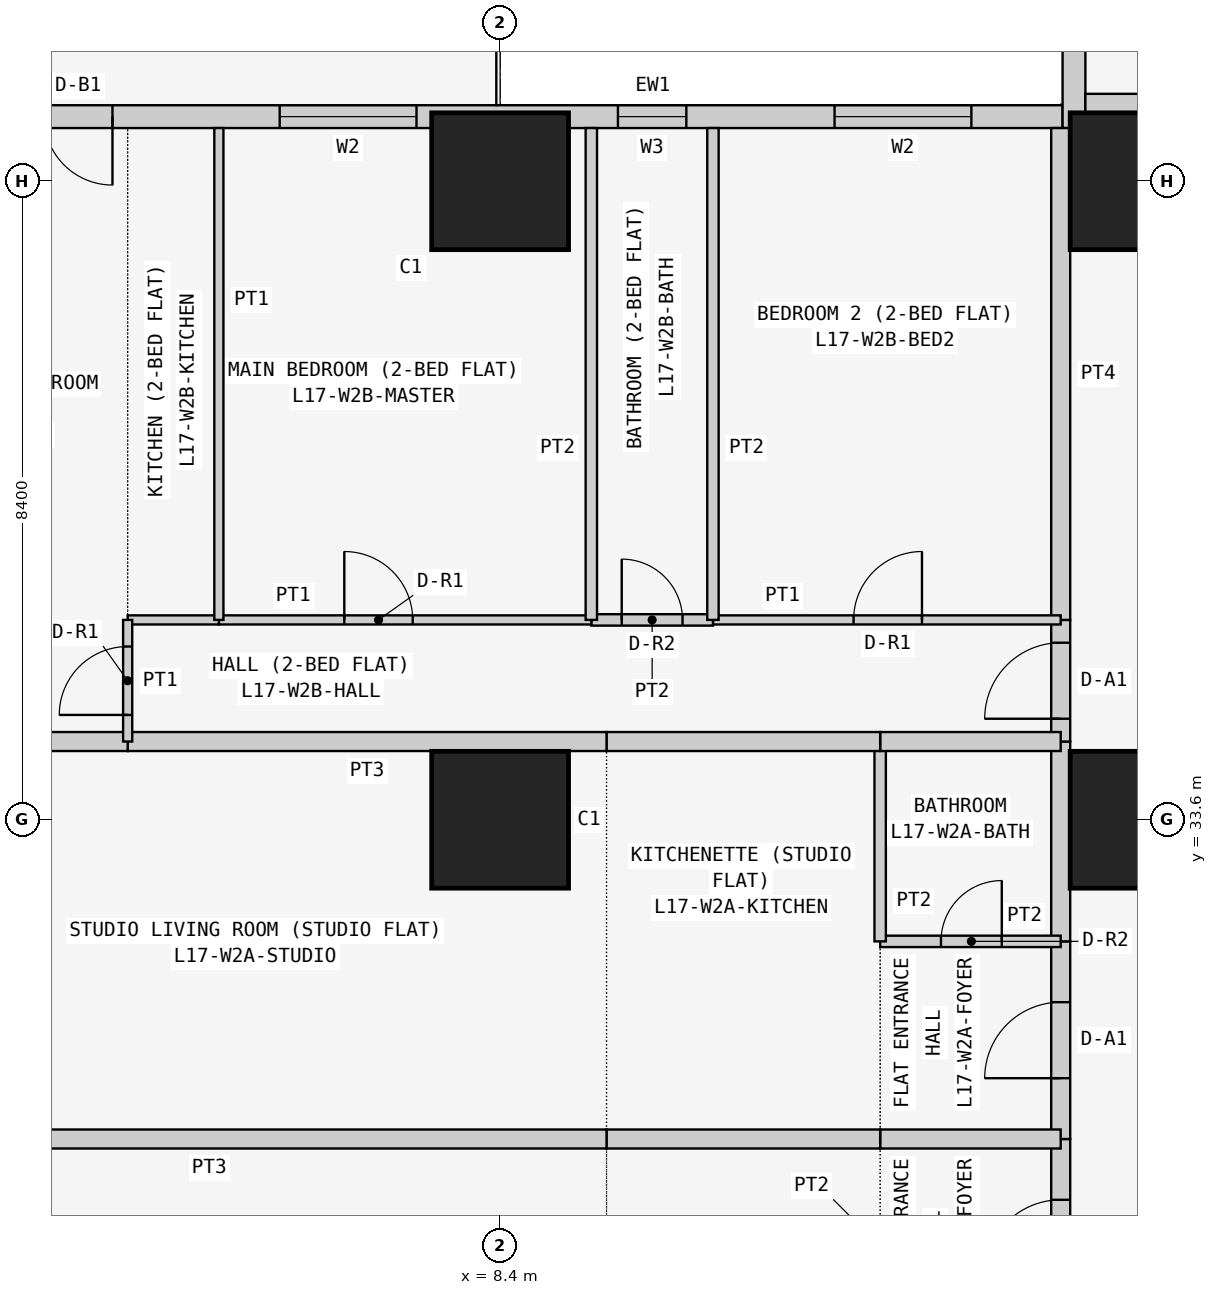
"""IFC4 building model, lengths in metres.
Left out: names, types, materials, properties, quantities, classifications, styles, units other than length and angle.
Written with IfcOpenShell. Run it as: python <this file> out.ifc"""

import sys

from ifc_helpers import new_model, si_unit, direction, frame, frame_2d, origin, origin_2d, place, context, subcontext, project, spatial, rectangle, extrude, element, fill, save


model = new_model("IFC4")
c1 = context("Model", 3, precision=1e-05, world=origin(), true_north=direction((0.0, 1.0)))
c2 = subcontext(c1, "Body", "Model", "MODEL_VIEW")
j1 = project(units=[si_unit("LENGTHUNIT", "METRE"), si_unit("PLANEANGLEUNIT", "RADIAN")], contexts=[c1])
p1 = place(None, origin())
s1 = spatial("IfcSite", under=j1, at=p1, CompositionType="ELEMENT")
p2 = place(p1, origin())
s2 = spatial("IfcBuilding", under=s1, at=p2, CompositionType="ELEMENT")
p3 = place(p2, frame((0.0, 0.0, 70.5)))
s3 = spatial("IfcBuildingStorey", under=s2, at=p3, CompositionType="ELEMENT", Elevation=70.5)
for number, where, z_axis, x_axis in (
    (1, (8.4, 33.6, 0.0), (0.0, 0.0, 1.0), (1.0, 0.0, 0.0)),
    (2, (8.4, 42.0, 0.0), (0.0, 0.0, 1.0), (1.0, 0.0, 0.0)),
    (3, (16.8, 33.6, 0.0), (0.0, 0.0, 1.0), (1.0, 0.0, 0.0)),
    (4, (16.8, 42.0, 0.0), (0.0, 0.0, 1.0), (1.0, 0.0, 0.0)),
):
    element("IfcColumn", number, at=place(p3, frame(where, z_axis=z_axis, x_axis=x_axis)), inside=s3, PredefinedType="COLUMN", context=c2, shape_type="SweptSolid", body=[
        extrude(rectangle(XDim=1.8, YDim=1.8, at=origin_2d()), origin(), (0.0, 0.0, 1.0), 3.6),
    ])
p4 = place(p3, frame((15.8, 42.85, 0.0), z_axis=(0.0, 0.0, 1.0), x_axis=(-1.0, 0.0, 0.0)))
e5 = element("IfcWall", 5, at=p4, inside=s3, PredefinedType="SOLIDWALL", context=c2, shape_type="SweptSolid", body=[
    extrude(rectangle(XDim=15.4, YDim=0.3, at=frame_2d((7.7, 0.0))), origin(), (0.0, 0.0, 1.0), 3.45),
])
p5 = place(p4, frame((1.2, 0.0, 0.9)))
e6 = element("IfcOpeningElement", 6, at=p5, cuts=e5, PredefinedType="OPENING", context=c2, shape_type="SweptSolid", body=[
    extrude(rectangle(XDim=1.8, YDim=1.5, at=frame_2d((0.9, 0.75))), frame((0.0, 0.16, 0.0), z_axis=(0.0, -1.0, 0.0), x_axis=(1.0, 0.0, 0.0)), (0.0, 0.0, 1.0), 0.32),
])
p6 = place(p4, frame((4.95, 0.0, 1.5)))
e7 = element("IfcOpeningElement", 7, at=p6, cuts=e5, PredefinedType="OPENING", context=c2, shape_type="SweptSolid", body=[
    extrude(rectangle(XDim=0.9, YDim=0.7, at=frame_2d((0.45, 0.35))), frame((0.0, 0.16, 0.0), z_axis=(0.0, -1.0, 0.0), x_axis=(1.0, 0.0, 0.0)), (0.0, 0.0, 1.0), 0.32),
])
p7 = place(p4, frame((8.5, 0.0, 0.9)))
e8 = element("IfcOpeningElement", 8, at=p7, cuts=e5, PredefinedType="OPENING", context=c2, shape_type="SweptSolid", body=[
    extrude(rectangle(XDim=1.8, YDim=1.5, at=frame_2d((0.9, 0.75))), frame((0.0, 0.16, 0.0), z_axis=(0.0, -1.0, 0.0), x_axis=(1.0, 0.0, 0.0)), (0.0, 0.0, 1.0), 0.32),
])
p8 = place(p4, frame((12.5, 0.0, 0.0)))
e9 = element("IfcOpeningElement", 9, at=p8, cuts=e5, PredefinedType="OPENING", context=c2, shape_type="SweptSolid", body=[
    extrude(rectangle(XDim=0.9, YDim=2.4, at=frame_2d((0.45, 1.2))), frame((0.0, 0.16, 0.0), z_axis=(0.0, -1.0, 0.0), x_axis=(1.0, 0.0, 0.0)), (0.0, 0.0, 1.0), 0.32),
])
p9 = place(p4, frame((13.5, 0.0, 0.9)))
e10 = element("IfcOpeningElement", 10, at=p9, cuts=e5, PredefinedType="OPENING", context=c2, shape_type="SweptSolid", body=[
    extrude(rectangle(XDim=1.2, YDim=1.5, at=frame_2d((0.6, 0.75))), frame((0.0, 0.16, 0.0), z_axis=(0.0, -1.0, 0.0), x_axis=(1.0, 0.0, 0.0)), (0.0, 0.0, 1.0), 0.32),
])
p10 = place(p3, frame((15.95, 58.4, 0.0), z_axis=(0.0, 0.0, 1.0), x_axis=(0.0, -1.0, 0.0)))
e11 = element("IfcWall", 11, at=p10, inside=s3, PredefinedType="SOLIDWALL", context=c2, shape_type="SweptSolid", body=[
    extrude(rectangle(XDim=15.7, YDim=0.3, at=frame_2d((7.85, 0.0))), origin(), (0.0, 0.0, 1.0), 3.45),
])
p11 = place(p10, frame((12.4, 0.0, 0.9)))
e12 = element("IfcOpeningElement", 12, at=p11, cuts=e11, PredefinedType="OPENING", context=c2, shape_type="SweptSolid", body=[
    extrude(rectangle(XDim=1.8, YDim=1.5, at=frame_2d((0.9, 0.75))), frame((0.0, 0.16, 0.0), z_axis=(0.0, -1.0, 0.0), x_axis=(1.0, 0.0, 0.0)), (0.0, 0.0, 1.0), 0.32),
])
p12 = place(p10, frame((9.55, 0.0, 1.5)))
e13 = element("IfcOpeningElement", 13, at=p12, cuts=e11, PredefinedType="OPENING", context=c2, shape_type="SweptSolid", body=[
    extrude(rectangle(XDim=0.9, YDim=0.7, at=frame_2d((0.45, 0.35))), frame((0.0, 0.16, 0.0), z_axis=(0.0, -1.0, 0.0), x_axis=(1.0, 0.0, 0.0)), (0.0, 0.0, 1.0), 0.32),
])
p13 = place(p10, frame((5.1, 0.0, 0.9)))
e14 = element("IfcOpeningElement", 14, at=p13, cuts=e11, PredefinedType="OPENING", context=c2, shape_type="SweptSolid", body=[
    extrude(rectangle(XDim=1.8, YDim=1.5, at=frame_2d((0.9, 0.75))), frame((0.0, 0.16, 0.0), z_axis=(0.0, -1.0, 0.0), x_axis=(1.0, 0.0, 0.0)), (0.0, 0.0, 1.0), 0.32),
])
p14 = place(p10, frame((2.0, 0.0, 0.0)))
e15 = element("IfcOpeningElement", 15, at=p14, cuts=e11, PredefinedType="OPENING", context=c2, shape_type="SweptSolid", body=[
    extrude(rectangle(XDim=0.9, YDim=2.4, at=frame_2d((0.45, 1.2))), frame((0.0, 0.16, 0.0), z_axis=(0.0, -1.0, 0.0), x_axis=(1.0, 0.0, 0.0)), (0.0, 0.0, 1.0), 0.32),
])
p15 = place(p10, frame((0.7, 0.0, 0.9)))
e16 = element("IfcOpeningElement", 16, at=p15, cuts=e11, PredefinedType="OPENING", context=c2, shape_type="SweptSolid", body=[
    extrude(rectangle(XDim=1.2, YDim=1.5, at=frame_2d((0.6, 0.75))), frame((0.0, 0.16, 0.0), z_axis=(0.0, -1.0, 0.0), x_axis=(1.0, 0.0, 0.0)), (0.0, 0.0, 1.0), 0.32),
])
p16 = place(p3, frame((16.1, 43.025, 0.0), z_axis=(0.0, 0.0, 1.0), x_axis=(1.0, 0.0, 0.0)))
e17 = element("IfcWall", 17, at=p16, inside=s3, PredefinedType="PARTITIONING", context=c2, shape_type="SweptSolid", body=[
    extrude(rectangle(XDim=6.871, YDim=0.25, at=frame_2d((3.436, 0.0))), origin(), (0.0, 0.0, 1.0), 3.45),
])
p17 = place(p3, frame((15.775, 26.8, 0.0), z_axis=(0.0, 0.0, 1.0), x_axis=(0.0, 1.0, 0.0)))
e18 = element("IfcWall", 18, at=p17, inside=s3, PredefinedType="PARTITIONING", context=c2, shape_type="SweptSolid", body=[
    extrude(rectangle(XDim=2.6, YDim=0.25, at=frame_2d((1.3, 0.0))), origin(), (0.0, 0.0, 1.0), 3.45),
])
p18 = place(p17, frame((0.8, 0.0, 0.0)))
e19 = element("IfcOpeningElement", 19, at=p18, cuts=e18, PredefinedType="OPENING", context=c2, shape_type="SweptSolid", body=[
    extrude(rectangle(XDim=1.0, YDim=2.1, at=frame_2d((0.5, 1.05))), frame((0.0, 0.135, 0.0), z_axis=(0.0, -1.0, 0.0), x_axis=(1.0, 0.0, 0.0)), (0.0, 0.0, 1.0), 0.27),
])
p19 = place(p3, frame((15.775, 29.4, 0.0), z_axis=(0.0, 0.0, 1.0), x_axis=(0.0, 1.0, 0.0)))
e20 = element("IfcWall", 20, at=p19, inside=s3, PredefinedType="PARTITIONING", context=c2, shape_type="SweptSolid", body=[
    extrude(rectangle(XDim=2.6, YDim=0.25, at=frame_2d((1.3, 0.0))), origin(), (0.0, 0.0, 1.0), 3.45),
])
p20 = place(p19, frame((0.8, 0.0, 0.0)))
e21 = element("IfcOpeningElement", 21, at=p20, cuts=e20, PredefinedType="OPENING", context=c2, shape_type="SweptSolid", body=[
    extrude(rectangle(XDim=1.0, YDim=2.1, at=frame_2d((0.5, 1.05))), frame((0.0, 0.135, 0.0), z_axis=(0.0, -1.0, 0.0), x_axis=(1.0, 0.0, 0.0)), (0.0, 0.0, 1.0), 0.27),
])
p21 = place(p3, frame((15.775, 32.0, 0.0), z_axis=(0.0, 0.0, 1.0), x_axis=(0.0, 1.0, 0.0)))
e22 = element("IfcWall", 22, at=p21, inside=s3, PredefinedType="PARTITIONING", context=c2, shape_type="SweptSolid", body=[
    extrude(rectangle(XDim=2.629, YDim=0.25, at=frame_2d((1.314, 0.0))), origin(), (0.0, 0.0, 1.0), 3.45),
])
p22 = place(p3, frame((15.775, 34.629, 0.0), z_axis=(0.0, 0.0, 1.0), x_axis=(0.0, 1.0, 0.0)))
e23 = element("IfcWall", 23, at=p22, inside=s3, PredefinedType="PARTITIONING", context=c2, shape_type="SweptSolid", body=[
    extrude(rectangle(XDim=1.6, YDim=0.25, at=frame_2d((0.8, 0.0))), origin(), (0.0, 0.0, 1.0), 3.45),
])
p23 = place(p22, frame((0.3, 0.0, 0.0)))
e24 = element("IfcOpeningElement", 24, at=p23, cuts=e23, PredefinedType="OPENING", context=c2, shape_type="SweptSolid", body=[
    extrude(rectangle(XDim=1.0, YDim=2.1, at=frame_2d((0.5, 1.05))), frame((0.0, 0.135, 0.0), z_axis=(0.0, -1.0, 0.0), x_axis=(1.0, 0.0, 0.0)), (0.0, 0.0, 1.0), 0.27),
])
p24 = place(p3, frame((15.775, 36.229, 0.0), z_axis=(0.0, 0.0, 1.0), x_axis=(0.0, 1.0, 0.0)))
e25 = element("IfcWall", 25, at=p24, inside=s3, PredefinedType="PARTITIONING", context=c2, shape_type="SweptSolid", body=[
    extrude(rectangle(XDim=6.471, YDim=0.25, at=frame_2d((3.235, 0.0))), origin(), (0.0, 0.0, 1.0), 3.45),
])
p25 = place(p3, frame((15.775, 29.4, 0.0), z_axis=(0.0, 0.0, 1.0), x_axis=(-1.0, 0.0, 0.0)))
e26 = element("IfcWall", 26, at=p25, inside=s3, PredefinedType="PARTITIONING", context=c2, shape_type="SweptSolid", body=[
    extrude(rectangle(XDim=2.375, YDim=0.25, at=frame_2d((1.188, 0.0))), origin(), (0.0, 0.0, 1.0), 3.45),
])
p26 = place(p3, frame((13.4, 29.4, 0.0), z_axis=(0.0, 0.0, 1.0), x_axis=(-1.0, 0.0, 0.0)))
e27 = element("IfcWall", 27, at=p26, inside=s3, PredefinedType="PARTITIONING", context=c2, shape_type="SweptSolid", body=[
    extrude(rectangle(XDim=3.6, YDim=0.25, at=frame_2d((1.8, 0.0))), origin(), (0.0, 0.0, 1.0), 3.45),
])
p27 = place(p3, frame((9.8, 29.4, 0.0), z_axis=(0.0, 0.0, 1.0), x_axis=(-1.0, 0.0, 0.0)))
e28 = element("IfcWall", 28, at=p27, inside=s3, PredefinedType="PARTITIONING", context=c2, shape_type="SweptSolid", body=[
    extrude(rectangle(XDim=10.45, YDim=0.25, at=frame_2d((5.225, 0.0))), origin(), (0.0, 0.0, 1.0), 3.45),
])
p28 = place(p3, frame((13.4, 32.0, 0.0), z_axis=(0.0, 0.0, 1.0), x_axis=(1.0, 0.0, 0.0)))
e29 = element("IfcWall", 29, at=p28, inside=s3, PredefinedType="PARTITIONING", context=c2, shape_type="SweptSolid", body=[
    extrude(rectangle(XDim=2.375, YDim=0.15, at=frame_2d((1.188, 0.0))), origin(), (0.0, 0.0, 1.0), 3.45),
])
p29 = place(p28, frame((0.8, 0.0, 0.0)))
e30 = element("IfcOpeningElement", 30, at=p29, cuts=e29, PredefinedType="OPENING", context=c2, shape_type="SweptSolid", body=[
    extrude(rectangle(XDim=0.8, YDim=2.1, at=frame_2d((0.4, 1.05))), frame((0.0, 0.085, 0.0), z_axis=(0.0, -1.0, 0.0), x_axis=(1.0, 0.0, 0.0)), (0.0, 0.0, 1.0), 0.17),
])
p30 = place(p3, frame((13.4, 32.0, 0.0), z_axis=(0.0, 0.0, 1.0), x_axis=(0.0, 1.0, 0.0)))
e31 = element("IfcWall", 31, at=p30, inside=s3, PredefinedType="PARTITIONING", context=c2, shape_type="SweptSolid", body=[
    extrude(rectangle(XDim=2.629, YDim=0.15, at=frame_2d((1.314, 0.0))), origin(), (0.0, 0.0, 1.0), 3.45),
])
p31 = place(p3, frame((13.4, 34.629, 0.0), z_axis=(0.0, 0.0, 1.0), x_axis=(1.0, 0.0, 0.0)))
e32 = element("IfcWall", 32, at=p31, inside=s3, PredefinedType="PARTITIONING", context=c2, shape_type="SweptSolid", body=[
    extrude(rectangle(XDim=2.375, YDim=0.25, at=frame_2d((1.188, 0.0))), origin(), (0.0, 0.0, 1.0), 3.45),
])
p32 = place(p3, frame((9.8, 34.629, 0.0), z_axis=(0.0, 0.0, 1.0), x_axis=(1.0, 0.0, 0.0)))
e33 = element("IfcWall", 33, at=p32, inside=s3, PredefinedType="PARTITIONING", context=c2, shape_type="SweptSolid", body=[
    extrude(rectangle(XDim=3.6, YDim=0.25, at=frame_2d((1.8, 0.0))), origin(), (0.0, 0.0, 1.0), 3.45),
])
p33 = place(p3, frame((3.5, 34.629, 0.0), z_axis=(0.0, 0.0, 1.0), x_axis=(1.0, 0.0, 0.0)))
e34 = element("IfcWall", 34, at=p33, inside=s3, PredefinedType="PARTITIONING", context=c2, shape_type="SweptSolid", body=[
    extrude(rectangle(XDim=6.3, YDim=0.25, at=frame_2d((3.15, 0.0))), origin(), (0.0, 0.0, 1.0), 3.45),
])
p34 = place(p3, frame((-0.65, 34.629, 0.0), z_axis=(0.0, 0.0, 1.0), x_axis=(1.0, 0.0, 0.0)))
e35 = element("IfcWall", 35, at=p34, inside=s3, PredefinedType="PARTITIONING", context=c2, shape_type="SweptSolid", body=[
    extrude(rectangle(XDim=4.15, YDim=0.25, at=frame_2d((2.075, 0.0))), origin(), (0.0, 0.0, 1.0), 3.45),
])
p35 = place(p3, frame((11.2, 36.229, 0.0), z_axis=(0.0, 0.0, 1.0), x_axis=(1.0, 0.0, 0.0)))
e36 = element("IfcWall", 36, at=p35, inside=s3, PredefinedType="PARTITIONING", context=c2, shape_type="SweptSolid", body=[
    extrude(rectangle(XDim=4.575, YDim=0.12, at=frame_2d((2.288, 0.0))), origin(), (0.0, 0.0, 1.0), 3.45),
])
p36 = place(p35, frame((1.85, 0.0, 0.0)))
e37 = element("IfcOpeningElement", 37, at=p36, cuts=e36, PredefinedType="OPENING", context=c2, shape_type="SweptSolid", body=[
    extrude(rectangle(XDim=0.9, YDim=2.1, at=frame_2d((0.45, 1.05))), frame((0.0, 0.07, 0.0), z_axis=(0.0, -1.0, 0.0), x_axis=(1.0, 0.0, 0.0)), (0.0, 0.0, 1.0), 0.14),
])
p37 = place(p3, frame((9.6, 36.229, 0.0), z_axis=(0.0, 0.0, 1.0), x_axis=(1.0, 0.0, 0.0)))
e38 = element("IfcWall", 38, at=p37, inside=s3, PredefinedType="PARTITIONING", context=c2, shape_type="SweptSolid", body=[
    extrude(rectangle(XDim=1.6, YDim=0.15, at=frame_2d((0.8, 0.0))), origin(), (0.0, 0.0, 1.0), 3.45),
])
p38 = place(p37, frame((0.4, 0.0, 0.0)))
e39 = element("IfcOpeningElement", 39, at=p38, cuts=e38, PredefinedType="OPENING", context=c2, shape_type="SweptSolid", body=[
    extrude(rectangle(XDim=0.8, YDim=2.1, at=frame_2d((0.4, 1.05))), frame((0.0, 0.085, 0.0), z_axis=(0.0, -1.0, 0.0), x_axis=(1.0, 0.0, 0.0)), (0.0, 0.0, 1.0), 0.17),
])
p39 = place(p3, frame((4.7, 36.229, 0.0), z_axis=(0.0, 0.0, 1.0), x_axis=(1.0, 0.0, 0.0)))
e40 = element("IfcWall", 40, at=p39, inside=s3, PredefinedType="PARTITIONING", context=c2, shape_type="SweptSolid", body=[
    extrude(rectangle(XDim=4.9, YDim=0.12, at=frame_2d((2.45, 0.0))), origin(), (0.0, 0.0, 1.0), 3.45),
])
p40 = place(p39, frame((1.65, 0.0, 0.0)))
e41 = element("IfcOpeningElement", 41, at=p40, cuts=e40, PredefinedType="OPENING", context=c2, shape_type="SweptSolid", body=[
    extrude(rectangle(XDim=0.9, YDim=2.1, at=frame_2d((0.45, 1.05))), frame((0.0, 0.07, 0.0), z_axis=(0.0, -1.0, 0.0), x_axis=(1.0, 0.0, 0.0)), (0.0, 0.0, 1.0), 0.14),
])
p41 = place(p3, frame((3.5, 36.229, 0.0), z_axis=(0.0, 0.0, 1.0), x_axis=(1.0, 0.0, 0.0)))
e42 = element("IfcWall", 42, at=p41, inside=s3, PredefinedType="PARTITIONING", context=c2, shape_type="SweptSolid", body=[
    extrude(rectangle(XDim=1.2, YDim=0.12, at=frame_2d((0.6, 0.0))), origin(), (0.0, 0.0, 1.0), 3.45),
])
p42 = place(p3, frame((3.5, 34.629, 0.0), z_axis=(0.0, 0.0, 1.0), x_axis=(0.0, 1.0, 0.0)))
e43 = element("IfcWall", 43, at=p42, inside=s3, PredefinedType="PARTITIONING", context=c2, shape_type="SweptSolid", body=[
    extrude(rectangle(XDim=1.6, YDim=0.12, at=frame_2d((0.8, 0.0))), origin(), (0.0, 0.0, 1.0), 3.45),
])
p43 = place(p42, frame((0.35, 0.0, 0.0)))
e44 = element("IfcOpeningElement", 44, at=p43, cuts=e43, PredefinedType="OPENING", context=c2, shape_type="SweptSolid", body=[
    extrude(rectangle(XDim=0.9, YDim=2.1, at=frame_2d((0.45, 1.05))), frame((0.0, 0.07, 0.0), z_axis=(0.0, -1.0, 0.0), x_axis=(1.0, 0.0, 0.0)), (0.0, 0.0, 1.0), 0.14),
])
for number, where, z_axis, x_axis in (
    (45, (11.2, 36.229, 0.0), (0.0, 0.0, 1.0), (0.0, 1.0, 0.0)),
    (46, (9.6, 36.229, 0.0), (0.0, 0.0, 1.0), (0.0, 1.0, 0.0)),
):
    element("IfcWall", number, at=place(p3, frame(where, z_axis=z_axis, x_axis=x_axis)), inside=s3, PredefinedType="PARTITIONING", context=c2, shape_type="SweptSolid", body=[
        extrude(rectangle(XDim=6.471, YDim=0.15, at=frame_2d((3.235, 0.0))), origin(), (0.0, 0.0, 1.0), 3.45),
    ])
p44 = place(p3, frame((4.7, 36.229, 0.0), z_axis=(0.0, 0.0, 1.0), x_axis=(0.0, 1.0, 0.0)))
e47 = element("IfcWall", 47, at=p44, inside=s3, PredefinedType="PARTITIONING", context=c2, shape_type="SweptSolid", body=[
    extrude(rectangle(XDim=6.471, YDim=0.12, at=frame_2d((3.235, 0.0))), origin(), (0.0, 0.0, 1.0), 3.45),
])
p45 = place(p5, origin())
e48 = element("IfcWindow", 48, at=p45, inside=s3, PartitioningType="SINGLE_PANEL", PredefinedType="WINDOW", context=c2, shape_type="SweptSolid", body=[
    extrude(rectangle(XDim=1.8, YDim=1.5, at=frame_2d((0.9, 0.75))), frame((0.0, 0.03, 0.0), z_axis=(0.0, -1.0, 0.0), x_axis=(1.0, 0.0, 0.0)), (0.0, 0.0, 1.0), 0.06),
])
fill(e6, e48)
p46 = place(p6, origin())
e49 = element("IfcWindow", 49, at=p46, inside=s3, PartitioningType="SINGLE_PANEL", PredefinedType="WINDOW", context=c2, shape_type="SweptSolid", body=[
    extrude(rectangle(XDim=0.9, YDim=0.7, at=frame_2d((0.45, 0.35))), frame((0.0, 0.03, 0.0), z_axis=(0.0, -1.0, 0.0), x_axis=(1.0, 0.0, 0.0)), (0.0, 0.0, 1.0), 0.06),
])
fill(e7, e49)
p47 = place(p7, origin())
e50 = element("IfcWindow", 50, at=p47, inside=s3, PartitioningType="SINGLE_PANEL", PredefinedType="WINDOW", context=c2, shape_type="SweptSolid", body=[
    extrude(rectangle(XDim=1.8, YDim=1.5, at=frame_2d((0.9, 0.75))), frame((0.0, 0.03, 0.0), z_axis=(0.0, -1.0, 0.0), x_axis=(1.0, 0.0, 0.0)), (0.0, 0.0, 1.0), 0.06),
])
fill(e8, e50)
p48 = place(p8, origin())
e51 = element("IfcDoor", 51, at=p48, inside=s3, OperationType="SINGLE_SWING_LEFT", PredefinedType="DOOR", context=c2, shape_type="SweptSolid", body=[
    extrude(rectangle(XDim=0.9, YDim=2.4, at=frame_2d((0.45, 1.2))), frame((0.0, 0.025, 0.0), z_axis=(0.0, -1.0, 0.0), x_axis=(1.0, 0.0, 0.0)), (0.0, 0.0, 1.0), 0.05),
])
fill(e9, e51)
p49 = place(p18, origin())
e52 = element("IfcDoor", 52, at=p49, inside=s3, OperationType="SINGLE_SWING_LEFT", PredefinedType="DOOR", context=c2, shape_type="SweptSolid", body=[
    extrude(rectangle(XDim=1.0, YDim=2.1, at=frame_2d((0.5, 1.05))), frame((0.0, 0.025, 0.0), z_axis=(0.0, -1.0, 0.0), x_axis=(1.0, 0.0, 0.0)), (0.0, 0.0, 1.0), 0.05),
])
fill(e19, e52)
p50 = place(p20, origin())
e53 = element("IfcDoor", 53, at=p50, inside=s3, OperationType="SINGLE_SWING_LEFT", PredefinedType="DOOR", context=c2, shape_type="SweptSolid", body=[
    extrude(rectangle(XDim=1.0, YDim=2.1, at=frame_2d((0.5, 1.05))), frame((0.0, 0.025, 0.0), z_axis=(0.0, -1.0, 0.0), x_axis=(1.0, 0.0, 0.0)), (0.0, 0.0, 1.0), 0.05),
])
fill(e21, e53)
p51 = place(p29, origin())
e54 = element("IfcDoor", 54, at=p51, inside=s3, OperationType="SINGLE_SWING_RIGHT", PredefinedType="DOOR", context=c2, shape_type="SweptSolid", body=[
    extrude(rectangle(XDim=0.8, YDim=2.1, at=frame_2d((0.4, 1.05))), frame((0.0, 0.025, 0.0), z_axis=(0.0, -1.0, 0.0), x_axis=(1.0, 0.0, 0.0)), (0.0, 0.0, 1.0), 0.05),
])
fill(e30, e54)
p52 = place(p23, origin())
e55 = element("IfcDoor", 55, at=p52, inside=s3, OperationType="SINGLE_SWING_LEFT", PredefinedType="DOOR", context=c2, shape_type="SweptSolid", body=[
    extrude(rectangle(XDim=1.0, YDim=2.1, at=frame_2d((0.5, 1.05))), frame((0.0, 0.025, 0.0), z_axis=(0.0, -1.0, 0.0), x_axis=(1.0, 0.0, 0.0)), (0.0, 0.0, 1.0), 0.05),
])
fill(e24, e55)
p53 = place(p36, origin())
e56 = element("IfcDoor", 56, at=p53, inside=s3, OperationType="SINGLE_SWING_RIGHT", PredefinedType="DOOR", context=c2, shape_type="SweptSolid", body=[
    extrude(rectangle(XDim=0.9, YDim=2.1, at=frame_2d((0.45, 1.05))), frame((0.0, 0.025, 0.0), z_axis=(0.0, -1.0, 0.0), x_axis=(1.0, 0.0, 0.0)), (0.0, 0.0, 1.0), 0.05),
])
fill(e37, e56)
p54 = place(p38, origin())
e57 = element("IfcDoor", 57, at=p54, inside=s3, OperationType="SINGLE_SWING_LEFT", PredefinedType="DOOR", context=c2, shape_type="SweptSolid", body=[
    extrude(rectangle(XDim=0.8, YDim=2.1, at=frame_2d((0.4, 1.05))), frame((0.0, 0.025, 0.0), z_axis=(0.0, -1.0, 0.0), x_axis=(1.0, 0.0, 0.0)), (0.0, 0.0, 1.0), 0.05),
])
fill(e39, e57)
p55 = place(p40, origin())
e58 = element("IfcDoor", 58, at=p55, inside=s3, OperationType="SINGLE_SWING_LEFT", PredefinedType="DOOR", context=c2, shape_type="SweptSolid", body=[
    extrude(rectangle(XDim=0.9, YDim=2.1, at=frame_2d((0.45, 1.05))), frame((0.0, 0.025, 0.0), z_axis=(0.0, -1.0, 0.0), x_axis=(1.0, 0.0, 0.0)), (0.0, 0.0, 1.0), 0.05),
])
fill(e41, e58)
p56 = place(p43, origin())
e59 = element("IfcDoor", 59, at=p56, inside=s3, OperationType="SINGLE_SWING_LEFT", PredefinedType="DOOR", context=c2, shape_type="SweptSolid", body=[
    extrude(rectangle(XDim=0.9, YDim=2.1, at=frame_2d((0.45, 1.05))), frame((0.0, 0.025, 0.0), z_axis=(0.0, -1.0, 0.0), x_axis=(1.0, 0.0, 0.0)), (0.0, 0.0, 1.0), 0.05),
])
fill(e44, e59)
save(model, sys.argv[1])
